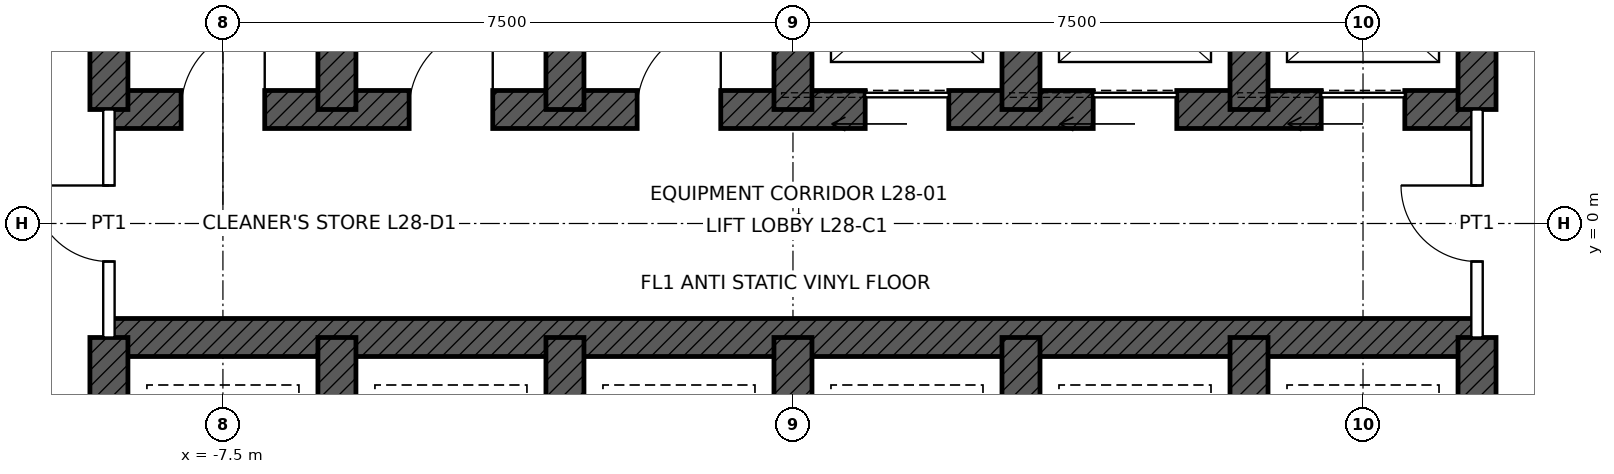
"""IFC4 building model, lengths in metres.
Left out: names, types, materials, properties, quantities, classifications, styles, units other than length and angle.
Written with IfcOpenShell. Run it as: python <this file> out.ifc"""

import sys

from ifc_helpers import new_model, si_unit, direction, frame, frame_2d, origin, place, context, subcontext, project, spatial, rectangle, extrude, element, fill, save


model = new_model("IFC4")
c1 = context("Model", 3, precision=1e-05, world=origin(), true_north=direction((0.0, 1.0)))
c2 = subcontext(c1, "Body", "Model", "MODEL_VIEW")
j1 = project(units=[si_unit("LENGTHUNIT", "METRE"), si_unit("PLANEANGLEUNIT", "RADIAN")], contexts=[c1])
p1 = place(None, origin())
s1 = spatial("IfcSite", under=j1, at=p1, CompositionType="ELEMENT")
p2 = place(p1, origin())
s2 = spatial("IfcBuilding", under=s1, at=p2, CompositionType="ELEMENT")
p3 = place(p2, frame((0.0, 0.0, 140.4)))
s3 = spatial("IfcBuildingStorey", under=s2, at=p3, CompositionType="ELEMENT", Elevation=140.4)
p4 = place(p3, frame((-9.0, 1.5, 0.0), z_axis=(0.0, 0.0, 1.0), x_axis=(1.0, 0.0, 0.0)))
e1 = element("IfcWall", 1, at=p4, inside=s3, PredefinedType="SHEAR", context=c2, shape_type="SweptSolid", body=[
    extrude(rectangle(XDim=18.0, YDim=0.5, at=frame_2d((9.0, 0.0))), origin(), (0.0, 0.0, 1.0), 4.5),
])
p5 = place(p4, frame((9.95, 0.0, 0.0)))
e2 = element("IfcOpeningElement", 2, at=p5, cuts=e1, PredefinedType="OPENING", context=c2, shape_type="SweptSolid", body=[
    extrude(rectangle(XDim=1.1, YDim=2.1, at=frame_2d((0.55, 1.05))), frame((0.0, 0.26, 0.0), z_axis=(0.0, -1.0, 0.0), x_axis=(1.0, 0.0, 0.0)), (0.0, 0.0, 1.0), 0.52),
])
p6 = place(p4, frame((12.95, 0.0, 0.0)))
e3 = element("IfcOpeningElement", 3, at=p6, cuts=e1, PredefinedType="OPENING", context=c2, shape_type="SweptSolid", body=[
    extrude(rectangle(XDim=1.1, YDim=2.1, at=frame_2d((0.55, 1.05))), frame((0.0, 0.26, 0.0), z_axis=(0.0, -1.0, 0.0), x_axis=(1.0, 0.0, 0.0)), (0.0, 0.0, 1.0), 0.52),
])
p7 = place(p4, frame((15.95, 0.0, 0.0)))
e4 = element("IfcOpeningElement", 4, at=p7, cuts=e1, PredefinedType="OPENING", context=c2, shape_type="SweptSolid", body=[
    extrude(rectangle(XDim=1.1, YDim=2.1, at=frame_2d((0.55, 1.05))), frame((0.0, 0.26, 0.0), z_axis=(0.0, -1.0, 0.0), x_axis=(1.0, 0.0, 0.0)), (0.0, 0.0, 1.0), 0.52),
])
p8 = place(p4, frame((0.95, 0.0, 0.0)))
e5 = element("IfcOpeningElement", 5, at=p8, cuts=e1, PredefinedType="OPENING", context=c2, shape_type="SweptSolid", body=[
    extrude(rectangle(XDim=1.1, YDim=2.1, at=frame_2d((0.55, 1.05))), frame((0.0, 0.26, 0.0), z_axis=(0.0, -1.0, 0.0), x_axis=(1.0, 0.0, 0.0)), (0.0, 0.0, 1.0), 0.52),
])
p9 = place(p4, frame((3.95, 0.0, 0.0)))
e6 = element("IfcOpeningElement", 6, at=p9, cuts=e1, PredefinedType="OPENING", context=c2, shape_type="SweptSolid", body=[
    extrude(rectangle(XDim=1.1, YDim=2.1, at=frame_2d((0.55, 1.05))), frame((0.0, 0.26, 0.0), z_axis=(0.0, -1.0, 0.0), x_axis=(1.0, 0.0, 0.0)), (0.0, 0.0, 1.0), 0.52),
])
p10 = place(p4, frame((6.95, 0.0, 0.0)))
e7 = element("IfcOpeningElement", 7, at=p10, cuts=e1, PredefinedType="OPENING", context=c2, shape_type="SweptSolid", body=[
    extrude(rectangle(XDim=1.1, YDim=2.1, at=frame_2d((0.55, 1.05))), frame((0.0, 0.26, 0.0), z_axis=(0.0, -1.0, 0.0), x_axis=(1.0, 0.0, 0.0)), (0.0, 0.0, 1.0), 0.52),
])
p11 = place(p3, frame((-9.0, -1.5, 0.0), z_axis=(0.0, 0.0, 1.0), x_axis=(1.0, 0.0, 0.0)))
e8 = element("IfcWall", 8, at=p11, inside=s3, PredefinedType="SHEAR", context=c2, shape_type="SweptSolid", body=[
    extrude(rectangle(XDim=18.0, YDim=0.5, at=frame_2d((9.0, 0.0))), origin(), (0.0, 0.0, 1.0), 4.5),
])
for number, where, z_axis, x_axis in (
    (9, (-9.0, 1.5, 0.0), (0.0, 0.0, 1.0), (0.0, 1.0, 0.0)),
    (10, (9.0, 1.5, 0.0), (0.0, 0.0, 1.0), (0.0, 1.0, 0.0)),
    (11, (-9.0, -4.5, 0.0), (0.0, 0.0, 1.0), (0.0, 1.0, 0.0)),
    (12, (9.0, -4.5, 0.0), (0.0, 0.0, 1.0), (0.0, 1.0, 0.0)),
    (13, (-6.0, 1.5, 0.0), (0.0, 0.0, 1.0), (0.0, 1.0, 0.0)),
    (14, (-3.0, 1.5, 0.0), (0.0, 0.0, 1.0), (0.0, 1.0, 0.0)),
    (15, (0.0, 1.5, 0.0), (0.0, 0.0, 1.0), (0.0, 1.0, 0.0)),
    (16, (3.0, 1.5, 0.0), (0.0, 0.0, 1.0), (0.0, 1.0, 0.0)),
    (17, (6.0, 1.5, 0.0), (0.0, 0.0, 1.0), (0.0, 1.0, 0.0)),
    (18, (-6.0, -4.5, 0.0), (0.0, 0.0, 1.0), (0.0, 1.0, 0.0)),
    (19, (-3.0, -4.5, 0.0), (0.0, 0.0, 1.0), (0.0, 1.0, 0.0)),
    (20, (0.0, -4.5, 0.0), (0.0, 0.0, 1.0), (0.0, 1.0, 0.0)),
    (21, (3.0, -4.5, 0.0), (0.0, 0.0, 1.0), (0.0, 1.0, 0.0)),
    (22, (6.0, -4.5, 0.0), (0.0, 0.0, 1.0), (0.0, 1.0, 0.0)),
):
    element("IfcWall", number, at=place(p3, frame(where, z_axis=z_axis, x_axis=x_axis)), inside=s3, PredefinedType="SHEAR", context=c2, shape_type="SweptSolid", body=[
        extrude(rectangle(XDim=3.0, YDim=0.5, at=frame_2d((1.5, 0.0))), origin(), (0.0, 0.0, 1.0), 4.5),
    ])
p12 = place(p3, frame((-9.0, -1.5, 0.0), z_axis=(0.0, 0.0, 1.0), x_axis=(0.0, 1.0, 0.0)))
e23 = element("IfcWall", 23, at=p12, inside=s3, PredefinedType="PARTITIONING", context=c2, shape_type="SweptSolid", body=[
    extrude(rectangle(XDim=3.0, YDim=0.15, at=frame_2d((1.5, 0.0))), origin(), (0.0, 0.0, 1.0), 4.25),
])
p13 = place(p12, frame((1.0, 0.0, 0.0)))
e24 = element("IfcOpeningElement", 24, at=p13, cuts=e23, PredefinedType="OPENING", context=c2, shape_type="SweptSolid", body=[
    extrude(rectangle(XDim=1.0, YDim=2.4, at=frame_2d((0.5, 1.2))), frame((0.0, 0.085, 0.0), z_axis=(0.0, -1.0, 0.0), x_axis=(1.0, 0.0, 0.0)), (0.0, 0.0, 1.0), 0.17),
])
p14 = place(p3, frame((9.0, -1.5, 0.0), z_axis=(0.0, 0.0, 1.0), x_axis=(0.0, 1.0, 0.0)))
e25 = element("IfcWall", 25, at=p14, inside=s3, PredefinedType="PARTITIONING", context=c2, shape_type="SweptSolid", body=[
    extrude(rectangle(XDim=3.0, YDim=0.15, at=frame_2d((1.5, 0.0))), origin(), (0.0, 0.0, 1.0), 4.25),
])
p15 = place(p14, frame((1.0, 0.0, 0.0)))
e26 = element("IfcOpeningElement", 26, at=p15, cuts=e25, PredefinedType="OPENING", context=c2, shape_type="SweptSolid", body=[
    extrude(rectangle(XDim=1.0, YDim=2.4, at=frame_2d((0.5, 1.2))), frame((0.0, 0.085, 0.0), z_axis=(0.0, -1.0, 0.0), x_axis=(1.0, 0.0, 0.0)), (0.0, 0.0, 1.0), 0.17),
])
p16 = place(p5, origin())
e27 = element("IfcDoor", 27, at=p16, inside=s3, OperationType="SLIDING_TO_LEFT", PredefinedType="DOOR", context=c2, shape_type="SweptSolid", body=[
    extrude(rectangle(XDim=1.1, YDim=2.1, at=frame_2d((0.55, 1.05))), frame((0.0, 0.025, 0.0), z_axis=(0.0, -1.0, 0.0), x_axis=(1.0, 0.0, 0.0)), (0.0, 0.0, 1.0), 0.05),
])
fill(e2, e27)
p17 = place(p6, origin())
e28 = element("IfcDoor", 28, at=p17, inside=s3, OperationType="SLIDING_TO_LEFT", PredefinedType="DOOR", context=c2, shape_type="SweptSolid", body=[
    extrude(rectangle(XDim=1.1, YDim=2.1, at=frame_2d((0.55, 1.05))), frame((0.0, 0.025, 0.0), z_axis=(0.0, -1.0, 0.0), x_axis=(1.0, 0.0, 0.0)), (0.0, 0.0, 1.0), 0.05),
])
fill(e3, e28)
p18 = place(p7, origin())
e29 = element("IfcDoor", 29, at=p18, inside=s3, OperationType="SLIDING_TO_LEFT", PredefinedType="DOOR", context=c2, shape_type="SweptSolid", body=[
    extrude(rectangle(XDim=1.1, YDim=2.1, at=frame_2d((0.55, 1.05))), frame((0.0, 0.025, 0.0), z_axis=(0.0, -1.0, 0.0), x_axis=(1.0, 0.0, 0.0)), (0.0, 0.0, 1.0), 0.05),
])
fill(e4, e29)
p19 = place(p13, origin())
e30 = element("IfcDoor", 30, at=p19, inside=s3, OperationType="SINGLE_SWING_RIGHT", PredefinedType="DOOR", context=c2, shape_type="SweptSolid", body=[
    extrude(rectangle(XDim=1.0, YDim=2.4, at=frame_2d((0.5, 1.2))), frame((0.0, 0.025, 0.0), z_axis=(0.0, -1.0, 0.0), x_axis=(1.0, 0.0, 0.0)), (0.0, 0.0, 1.0), 0.05),
])
fill(e24, e30)
p20 = place(p15, origin())
e31 = element("IfcDoor", 31, at=p20, inside=s3, OperationType="SINGLE_SWING_RIGHT", PredefinedType="DOOR", context=c2, shape_type="SweptSolid", body=[
    extrude(rectangle(XDim=1.0, YDim=2.4, at=frame_2d((0.5, 1.2))), frame((0.0, 0.025, 0.0), z_axis=(0.0, -1.0, 0.0), x_axis=(1.0, 0.0, 0.0)), (0.0, 0.0, 1.0), 0.05),
])
fill(e26, e31)
p21 = place(p8, origin())
e32 = element("IfcDoor", 32, at=p21, inside=s3, OperationType="SINGLE_SWING_RIGHT", PredefinedType="DOOR", context=c2, shape_type="SweptSolid", body=[
    extrude(rectangle(XDim=1.1, YDim=2.1, at=frame_2d((0.55, 1.05))), frame((0.0, 0.025, 0.0), z_axis=(0.0, -1.0, 0.0), x_axis=(1.0, 0.0, 0.0)), (0.0, 0.0, 1.0), 0.05),
])
fill(e5, e32)
p22 = place(p9, origin())
e33 = element("IfcDoor", 33, at=p22, inside=s3, OperationType="SINGLE_SWING_RIGHT", PredefinedType="DOOR", context=c2, shape_type="SweptSolid", body=[
    extrude(rectangle(XDim=1.1, YDim=2.1, at=frame_2d((0.55, 1.05))), frame((0.0, 0.025, 0.0), z_axis=(0.0, -1.0, 0.0), x_axis=(1.0, 0.0, 0.0)), (0.0, 0.0, 1.0), 0.05),
])
fill(e6, e33)
p23 = place(p10, origin())
e34 = element("IfcDoor", 34, at=p23, inside=s3, OperationType="SINGLE_SWING_RIGHT", PredefinedType="DOOR", context=c2, shape_type="SweptSolid", body=[
    extrude(rectangle(XDim=1.1, YDim=2.1, at=frame_2d((0.55, 1.05))), frame((0.0, 0.025, 0.0), z_axis=(0.0, -1.0, 0.0), x_axis=(1.0, 0.0, 0.0)), (0.0, 0.0, 1.0), 0.05),
])
fill(e7, e34)
save(model, sys.argv[1])
